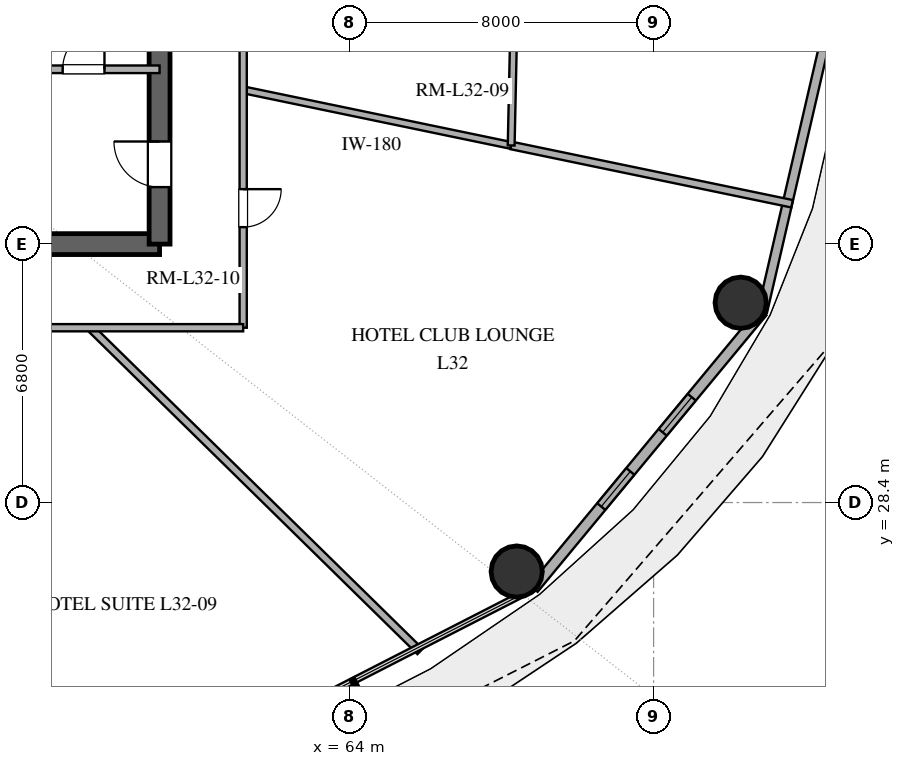
"""IFC4 building model, lengths in metres.
Left out: names, types, materials, properties, quantities, classifications, styles, units other than length and angle.
Written with IfcOpenShell. Run it as: python <this file> out.ifc"""

import sys

from ifc_helpers import new_model, si_unit, direction, frame, frame_2d, origin, origin_2d, place, context, subcontext, project, spatial, rectangle, hollow_circle, extrude, element, fill, save


model = new_model("IFC4")
c1 = context("Model", 3, precision=1e-05, world=origin(), true_north=direction((0.0, 1.0)))
c2 = subcontext(c1, "Body", "Model", "MODEL_VIEW")
j1 = project(units=[si_unit("LENGTHUNIT", "METRE"), si_unit("PLANEANGLEUNIT", "RADIAN")], contexts=[c1])
p1 = place(None, origin())
s1 = spatial("IfcSite", under=j1, at=p1, CompositionType="ELEMENT")
p2 = place(p1, origin())
s2 = spatial("IfcBuilding", under=s1, at=p2, CompositionType="ELEMENT")
p3 = place(p2, frame((0.0, 0.0, 127.2)))
s3 = spatial("IfcBuildingStorey", under=s2, at=p3, CompositionType="ELEMENT", Elevation=127.2)
p4 = place(p3, frame((55.0, 35.2, 0.0), z_axis=(0.0, 0.0, 1.0), x_axis=(1.0, 0.0, 0.0)))
e1 = element("IfcWall", 1, at=p4, inside=s3, PredefinedType="SHEAR", context=c2, shape_type="SweptSolid", body=[
    extrude(rectangle(XDim=4.0, YDim=0.55, at=frame_2d((2.0, 0.0))), origin(), (0.0, 0.0, 1.0), 3.38),
])
p5 = place(p3, frame((59.0, 35.2, 0.0), z_axis=(0.0, 0.0, 1.0), x_axis=(0.0, 1.0, 0.0)))
e2 = element("IfcWall", 2, at=p5, inside=s3, PredefinedType="SHEAR", context=c2, shape_type="SweptSolid", body=[
    extrude(rectangle(XDim=13.6, YDim=0.55, at=frame_2d((6.8, 0.0))), origin(), (0.0, 0.0, 1.0), 3.38),
])
p6 = place(p5, frame((1.5, 0.0, 0.0)))
e3 = element("IfcOpeningElement", 3, at=p6, cuts=e2, PredefinedType="OPENING", context=c2, shape_type="SweptSolid", body=[
    extrude(rectangle(XDim=1.2, YDim=2.15, at=frame_2d((0.6, 1.075))), frame((0.0, 0.285, 0.0), z_axis=(0.0, -1.0, 0.0), x_axis=(1.0, 0.0, 0.0)), (0.0, 0.0, 1.0), 0.57),
])
for number, where, z_axis, x_axis in (
    (4, (68.398, 26.585, 0.0), (0.0, 0.0, 1.0), (1.0, 0.0, 0.0)),
    (5, (74.291, 33.657, 0.0), (0.0, 0.0, 1.0), (1.0, 0.0, 0.0)),
):
    element("IfcColumn", number, at=place(p3, frame(where, z_axis=z_axis, x_axis=x_axis)), inside=s3, PredefinedType="COLUMN", context=c2, shape_type="SweptSolid", body=[
        extrude(hollow_circle(Radius=0.675, WallThickness=0.036, at=origin_2d()), origin(), (0.0, 0.0, 1.0), 3.38),
    ])
p7 = place(p3, frame((68.84, 26.14, 0.0), z_axis=(0.0, 0.0, 1.0), x_axis=(0.637505817448, 0.770445541696, 0.0)))
e6 = element("IfcWall", 6, at=p7, inside=s3, PredefinedType="SOLIDWALL", context=c2, shape_type="SweptSolid", body=[
    extrude(rectangle(XDim=9.445, YDim=0.28, at=frame_2d((4.723, 0.0))), origin(), (0.0, 0.0, 1.0), 3.38),
])
p8 = place(p7, frame((2.797, 0.0, 0.85)))
e7 = element("IfcOpeningElement", 7, at=p8, cuts=e6, PredefinedType="OPENING", context=c2, shape_type="SweptSolid", body=[
    extrude(rectangle(XDim=1.2, YDim=1.6, at=frame_2d((0.6, 0.8))), frame((0.0, 0.15, 0.0), z_axis=(0.0, -1.0, 0.0), x_axis=(1.0, 0.0, 0.0)), (0.0, 0.0, 1.0), 0.3),
])
p9 = place(p7, frame((5.332, 0.0, 0.85)))
e8 = element("IfcOpeningElement", 8, at=p9, cuts=e6, PredefinedType="OPENING", context=c2, shape_type="SweptSolid", body=[
    extrude(rectangle(XDim=1.2, YDim=1.6, at=frame_2d((0.6, 0.8))), frame((0.0, 0.15, 0.0), z_axis=(0.0, -1.0, 0.0), x_axis=(1.0, 0.0, 0.0)), (0.0, 0.0, 1.0), 0.3),
])
p10 = place(p3, frame((74.861, 33.417, 0.0), z_axis=(0.0, 0.0, 1.0), x_axis=(0.22558597182, 0.974223264616, 0.0)))
e9 = element("IfcWall", 9, at=p10, inside=s3, PredefinedType="SOLIDWALL", context=c2, shape_type="SweptSolid", body=[
    extrude(rectangle(XDim=8.811, YDim=0.25, at=frame_2d((4.405, 0.0))), origin(), (0.0, 0.0, 1.0), 3.38),
])
p11 = place(p3, frame((55.0, 39.8, 0.0), z_axis=(0.0, 0.0, 1.0), x_axis=(1.0, 0.0, 0.0)))
e10 = element("IfcWall", 10, at=p11, inside=s3, PredefinedType="SOLIDWALL", context=c2, shape_type="SweptSolid", body=[
    extrude(rectangle(XDim=4.0, YDim=0.2, at=frame_2d((2.0, 0.0))), origin(), (0.0, 0.0, 1.0), 2.74),
])
p12 = place(p11, frame((1.45, 0.0, 0.0)))
e11 = element("IfcOpeningElement", 11, at=p12, cuts=e10, PredefinedType="OPENING", context=c2, shape_type="SweptSolid", body=[
    extrude(rectangle(XDim=1.1, YDim=2.15, at=frame_2d((0.55, 1.075))), frame((0.0, 0.11, 0.0), z_axis=(0.0, -1.0, 0.0), x_axis=(1.0, 0.0, 0.0)), (0.0, 0.0, 1.0), 0.22),
])
p13 = place(p3, frame((57.173, 33.0, 0.0), z_axis=(0.0, 0.0, 1.0), x_axis=(0.713799293149, -0.700350318841, 0.0)))
e12 = element("IfcWall", 12, at=p13, inside=s3, PredefinedType="PARTITIONING", context=c2, shape_type="SweptSolid", body=[
    extrude(rectangle(XDim=12.163, YDim=0.2, at=frame_2d((6.081, 0.0))), origin(), (0.0, 0.0, 1.0), 2.74),
])
p14 = place(p3, frame((75.643, 36.262, 0.0), z_axis=(0.0, 0.0, 1.0), x_axis=(-0.979129223201, 0.203238687937, 0.0)))
e13 = element("IfcWall", 13, at=p14, inside=s3, PredefinedType="PARTITIONING", context=c2, shape_type="SweptSolid", body=[
    extrude(rectangle(XDim=7.549, YDim=0.2, at=frame_2d((3.774, 0.0))), origin(), (0.0, 0.0, 1.0), 2.74),
])
p15 = place(p3, frame((68.252, 37.796, 0.0), z_axis=(0.0, 0.0, 1.0), x_axis=(-0.979121746523, 0.20327470449, 0.0)))
e14 = element("IfcWall", 14, at=p15, inside=s3, PredefinedType="PLUMBINGWALL", context=c2, shape_type="SweptSolid", body=[
    extrude(rectangle(XDim=7.203, YDim=0.18, at=frame_2d((3.601, 0.0))), origin(), (0.0, 0.0, 1.0), 2.74),
])
p16 = place(p3, frame((61.2, 41.749, 0.0), z_axis=(0.0, 0.0, 1.0), x_axis=(0.0, -1.0, 0.0)))
e15 = element("IfcWall", 15, at=p16, inside=s3, PredefinedType="PARTITIONING", context=c2, shape_type="SweptSolid", body=[
    extrude(rectangle(XDim=8.749, YDim=0.19, at=frame_2d((4.375, 0.0))), origin(), (0.0, 0.0, 1.0), 2.74),
])
p17 = place(p16, frame((5.103, 0.0, 0.0)))
e16 = element("IfcOpeningElement", 16, at=p17, cuts=e15, PredefinedType="OPENING", context=c2, shape_type="SweptSolid", body=[
    extrude(rectangle(XDim=1.0, YDim=2.2, at=frame_2d((0.5, 1.1))), frame((0.0, 0.105, 0.0), z_axis=(0.0, -1.0, 0.0), x_axis=(1.0, 0.0, 0.0)), (0.0, 0.0, 1.0), 0.21),
])
p18 = place(p3, frame((61.2, 33.0, 0.0), z_axis=(0.0, 0.0, 1.0), x_axis=(-1.0, 0.0, 0.0)))
e17 = element("IfcWall", 17, at=p18, inside=s3, PredefinedType="PARTITIONING", context=c2, shape_type="SweptSolid", body=[
    extrude(rectangle(XDim=9.355, YDim=0.19, at=frame_2d((4.678, 0.0))), origin(), (0.0, 0.0, 1.0), 2.74),
])
p19 = place(p18, frame((6.193, 0.0, 0.0)))
e18 = element("IfcOpeningElement", 18, at=p19, cuts=e17, PredefinedType="OPENING", context=c2, shape_type="SweptSolid", body=[
    extrude(rectangle(XDim=0.95, YDim=2.15, at=frame_2d((0.475, 1.075))), frame((0.0, 0.105, 0.0), z_axis=(0.0, -1.0, 0.0), x_axis=(1.0, 0.0, 0.0)), (0.0, 0.0, 1.0), 0.21),
])
p20 = place(p3, frame((68.333, 41.564, 0.0), z_axis=(0.0, 0.0, 1.0), x_axis=(-0.021438450782, -0.999770170003, 0.0)))
e19 = element("IfcWall", 19, at=p20, inside=s3, PredefinedType="PLUMBINGWALL", context=c2, shape_type="SweptSolid", body=[
    extrude(rectangle(XDim=3.77, YDim=0.18, at=frame_2d((1.885, 0.0))), origin(), (0.0, 0.0, 1.0), 2.74),
])
p21 = place(p8, origin())
e20 = element("IfcWindow", 20, at=p21, inside=s3, PartitioningType="SINGLE_PANEL", PredefinedType="WINDOW", context=c2, shape_type="SweptSolid", body=[
    extrude(rectangle(XDim=1.2, YDim=1.6, at=frame_2d((0.6, 0.8))), frame((0.0, 0.03, 0.0), z_axis=(0.0, -1.0, 0.0), x_axis=(1.0, 0.0, 0.0)), (0.0, 0.0, 1.0), 0.06),
])
fill(e7, e20)
p22 = place(p9, origin())
e21 = element("IfcWindow", 21, at=p22, inside=s3, PartitioningType="SINGLE_PANEL", PredefinedType="WINDOW", context=c2, shape_type="SweptSolid", body=[
    extrude(rectangle(XDim=1.2, YDim=1.6, at=frame_2d((0.6, 0.8))), frame((0.0, 0.03, 0.0), z_axis=(0.0, -1.0, 0.0), x_axis=(1.0, 0.0, 0.0)), (0.0, 0.0, 1.0), 0.06),
])
fill(e8, e21)
p23 = place(p6, origin())
e22 = element("IfcDoor", 22, at=p23, inside=s3, OperationType="SINGLE_SWING_RIGHT", PredefinedType="DOOR", context=c2, shape_type="SweptSolid", body=[
    extrude(rectangle(XDim=1.2, YDim=2.15, at=frame_2d((0.6, 1.075))), frame((0.0, 0.025, 0.0), z_axis=(0.0, -1.0, 0.0), x_axis=(1.0, 0.0, 0.0)), (0.0, 0.0, 1.0), 0.05),
])
fill(e3, e22)
p24 = place(p12, origin())
e23 = element("IfcDoor", 23, at=p24, inside=s3, OperationType="SINGLE_SWING_RIGHT", PredefinedType="DOOR", context=c2, shape_type="SweptSolid", body=[
    extrude(rectangle(XDim=1.1, YDim=2.15, at=frame_2d((0.55, 1.075))), frame((0.0, 0.025, 0.0), z_axis=(0.0, -1.0, 0.0), x_axis=(1.0, 0.0, 0.0)), (0.0, 0.0, 1.0), 0.05),
])
fill(e11, e23)
p25 = place(p17, origin())
e24 = element("IfcDoor", 24, at=p25, inside=s3, OperationType="SINGLE_SWING_LEFT", PredefinedType="DOOR", context=c2, shape_type="SweptSolid", body=[
    extrude(rectangle(XDim=1.0, YDim=2.2, at=frame_2d((0.5, 1.1))), frame((0.0, 0.025, 0.0), z_axis=(0.0, -1.0, 0.0), x_axis=(1.0, 0.0, 0.0)), (0.0, 0.0, 1.0), 0.05),
])
fill(e16, e24)
save(model, sys.argv[1])
